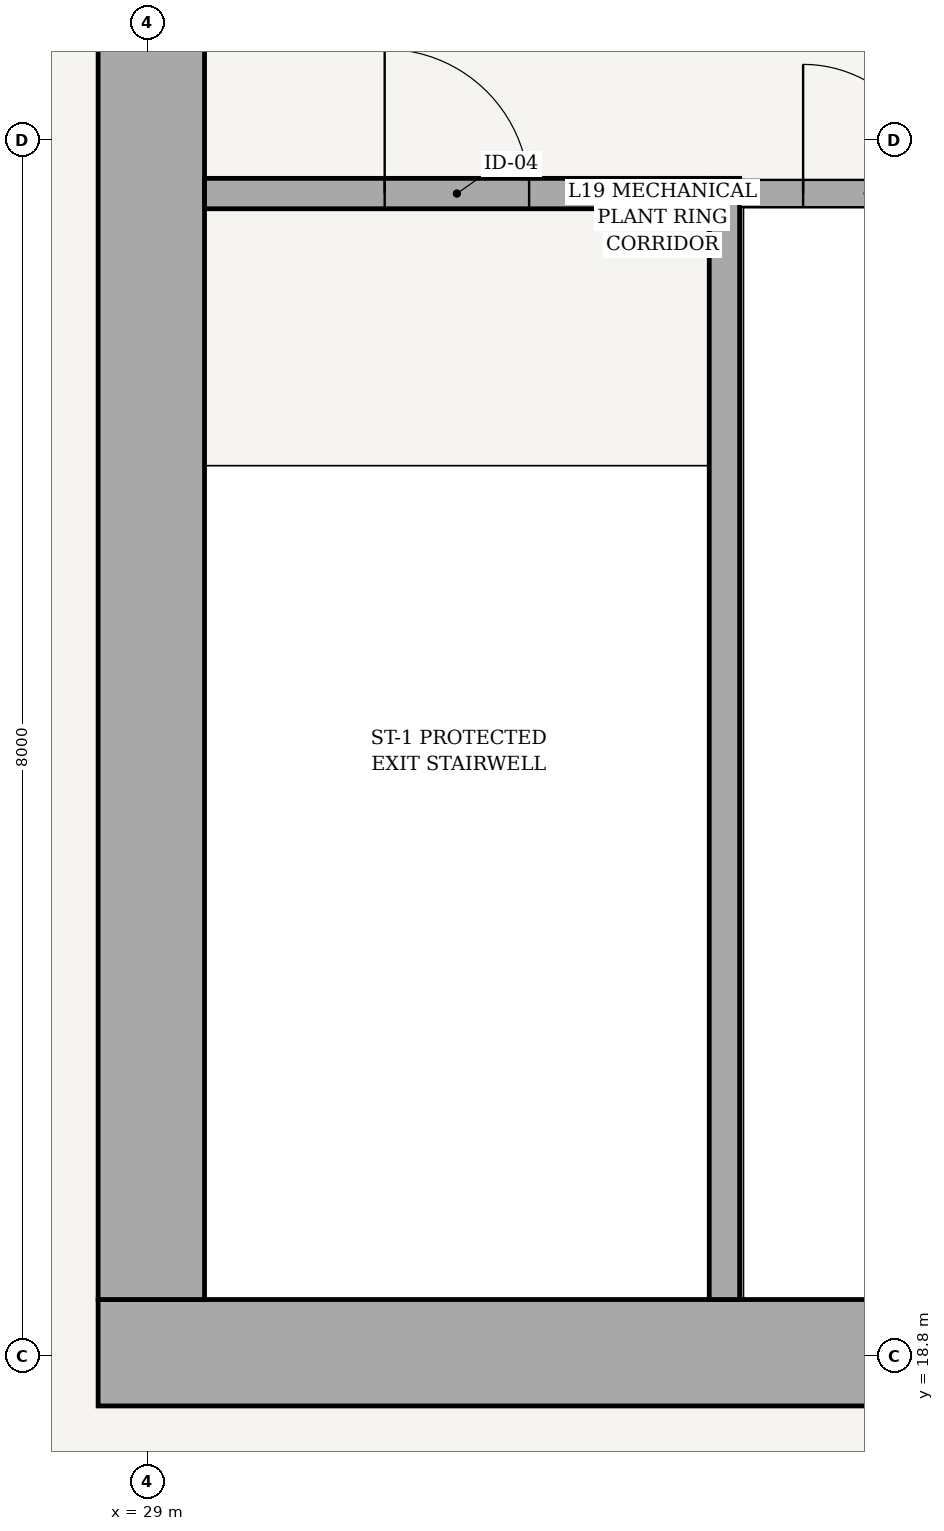
"""IFC4 building model, lengths in metres.
Left out: names, types, materials, properties, quantities, classifications, styles, units other than length and angle.
Written with IfcOpenShell. Run it as: python <this file> out.ifc"""

import sys

from ifc_helpers import new_model, si_unit, direction, frame, frame_2d, origin, origin_2d, place, context, subcontext, project, spatial, rectangle, extrude, source, transform, mapped, element, fill, save


model = new_model("IFC4")
c1 = context("Model", 3, precision=1e-05, world=origin(), true_north=direction((-0.2419218956, 0.970295726276)))
c2 = subcontext(c1, "Body", "Model", "MODEL_VIEW")
j1 = project(units=[si_unit("LENGTHUNIT", "METRE"), si_unit("PLANEANGLEUNIT", "RADIAN")], contexts=[c1])
p1 = place(None, origin())
s1 = spatial("IfcSite", under=j1, at=p1, CompositionType="ELEMENT")
p2 = place(p1, origin())
s2 = spatial("IfcBuilding", under=s1, at=p2, CompositionType="ELEMENT")
p3 = place(p2, frame((0.0, 0.0, 74.4)))
s3 = spatial("IfcBuildingStorey", under=s2, at=p3, CompositionType="ELEMENT", Elevation=74.4)
p4 = place(p3, frame((29.0, 18.8, 0.0), z_axis=(0.0, 0.0, 1.0), x_axis=(1.0, 0.0, 0.0)))
e1 = element("IfcColumn", 1, at=p4, inside=s3, PredefinedType="COLUMN", context=c2, shape_type="SweptSolid", body=[
    extrude(rectangle(XDim=1.1, YDim=1.1, at=origin_2d()), origin(), (0.0, 0.0, 1.0), 5.4),
])
p5 = place(p3, frame((28.675, 18.825, 0.0), z_axis=(0.0, 0.0, 1.0), x_axis=(1.0, 0.0, 0.0)))
e2 = element("IfcWall", 2, at=p5, inside=s3, PredefinedType="SHEAR", context=c2, shape_type="SweptSolid", body=[
    extrude(rectangle(XDim=18.65, YDim=0.7, at=frame_2d((9.325, 0.0))), origin(), (0.0, 0.0, 1.0), 5.125),
])
p6 = place(p5, frame((8.9, 0.0, 0.0)))
e3 = element("IfcOpeningElement", 3, at=p6, cuts=e2, PredefinedType="OPENING", context=c2, shape_type="SweptSolid", body=[
    extrude(rectangle(XDim=0.85, YDim=2.1, at=frame_2d((0.425, 1.05))), frame((0.0, 0.36, 0.0), z_axis=(0.0, -1.0, 0.0), x_axis=(1.0, 0.0, 0.0)), (0.0, 0.0, 1.0), 0.72),
])
p7 = place(p3, frame((29.025, 19.175, 0.0), z_axis=(0.0, 0.0, 1.0), x_axis=(0.0, 1.0, 0.0)))
e4 = element("IfcWall", 4, at=p7, inside=s3, PredefinedType="SHEAR", context=c2, shape_type="SweptSolid", body=[
    extrude(rectangle(XDim=15.25, YDim=0.7, at=frame_2d((7.625, 0.0))), origin(), (0.0, 0.0, 1.0), 5.125),
])
p8 = place(p7, frame((9.875, 0.0, 0.0)))
e5 = element("IfcOpeningElement", 5, at=p8, cuts=e4, PredefinedType="OPENING", context=c2, shape_type="SweptSolid", body=[
    extrude(rectangle(XDim=1.5, YDim=2.2, at=frame_2d((0.75, 1.1))), frame((0.0, 0.36, 0.0), z_axis=(0.0, -1.0, 0.0), x_axis=(1.0, 0.0, 0.0)), (0.0, 0.0, 1.0), 0.72),
])
p9 = place(p3, frame((32.795, 19.175, 0.0), z_axis=(0.0, 0.0, 1.0), x_axis=(0.0, 1.0, 0.0)))
e6 = element("IfcWall", 6, at=p9, inside=s3, PredefinedType="SOLIDWALL", context=c2, shape_type="SweptSolid", body=[
    extrude(rectangle(XDim=7.375, YDim=0.2, at=frame_2d((3.688, 0.0))), origin(), (0.0, 0.0, 1.0), 5.125),
])
p10 = place(p3, frame((29.375, 26.45, 0.0), z_axis=(0.0, 0.0, 1.0), x_axis=(1.0, 0.0, 0.0)))
e7 = element("IfcWall", 7, at=p10, inside=s3, PredefinedType="SOLIDWALL", context=c2, shape_type="SweptSolid", body=[
    extrude(rectangle(XDim=3.32, YDim=0.2, at=frame_2d((1.66, 0.0))), origin(), (0.0, 0.0, 1.0), 5.125),
])
p11 = place(p10, frame((1.185, 0.0, 0.0)))
e8 = element("IfcOpeningElement", 8, at=p11, cuts=e7, PredefinedType="OPENING", context=c2, shape_type="SweptSolid", body=[
    extrude(rectangle(XDim=0.95, YDim=2.15, at=frame_2d((0.475, 1.075))), frame((0.0, 0.11, 0.0), z_axis=(0.0, -1.0, 0.0), x_axis=(1.0, 0.0, 0.0)), (0.0, 0.0, 1.0), 0.22),
])
p12 = place(p3, frame((32.9, 26.45, 0.0), z_axis=(0.0, 0.0, 1.0), x_axis=(1.0, 0.0, 0.0)))
e9 = element("IfcWall", 9, at=p12, inside=s3, PredefinedType="PARTITIONING", context=c2, shape_type="SweptSolid", body=[
    extrude(rectangle(XDim=1.675, YDim=0.18, at=frame_2d((0.837, 0.0))), origin(), (0.0, 0.0, 1.0), 5.125),
])
p13 = place(p12, frame((0.413, 0.0, 0.0)))
e10 = element("IfcOpeningElement", 10, at=p13, cuts=e9, PredefinedType="OPENING", context=c2, shape_type="SweptSolid", body=[
    extrude(rectangle(XDim=0.85, YDim=2.1, at=frame_2d((0.425, 1.05))), frame((0.0, 0.1, 0.0), z_axis=(0.0, -1.0, 0.0), x_axis=(1.0, 0.0, 0.0)), (0.0, 0.0, 1.0), 0.2),
])
m1 = source(origin(), c2, "Body", "SweptSolid", [
    extrude(rectangle(XDim=0.95, YDim=2.15, at=frame_2d((0.475, 1.075))), frame((0.0, 0.025, 0.0), z_axis=(0.0, -1.0, 0.0), x_axis=(1.0, 0.0, 0.0)), (0.0, 0.0, 1.0), 0.05),
])
p14 = place(p11, origin())
e11 = element("IfcDoor", 11, at=p14, inside=s3, OperationType="SINGLE_SWING_LEFT", PredefinedType="DOOR", context=c2, shape_type="MappedRepresentation", body=[
    mapped(m1, transform((0.0, 0.0, 0.0), scale=1.0)),
])
fill(e8, e11)
m2 = source(origin(), c2, "Body", "SweptSolid", [
    extrude(rectangle(XDim=0.85, YDim=2.1, at=frame_2d((0.425, 1.05))), frame((0.0, 0.025, 0.0), z_axis=(0.0, -1.0, 0.0), x_axis=(1.0, 0.0, 0.0)), (0.0, 0.0, 1.0), 0.05),
])
p15 = place(p13, origin())
e12 = element("IfcDoor", 12, at=p15, inside=s3, OperationType="SINGLE_SWING_LEFT", PredefinedType="DOOR", context=c2, shape_type="MappedRepresentation", body=[
    mapped(m2, transform((0.0, 0.0, 0.0), scale=1.0)),
])
fill(e10, e12)
save(model, sys.argv[1])
